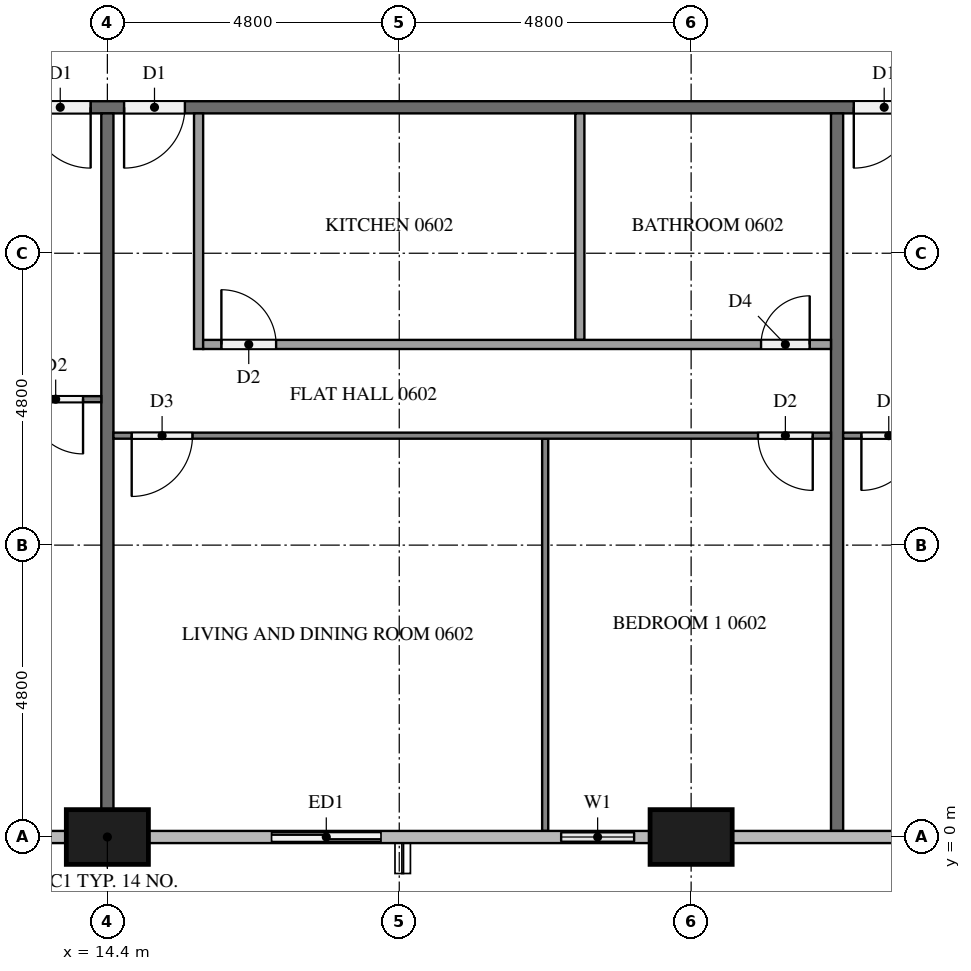
"""IFC4 building model, lengths in metres.
Left out: names, types, materials, properties, quantities, classifications, styles, units other than length and angle.
Written with IfcOpenShell. Run it as: python <this file> out.ifc"""

import sys

from ifc_helpers import new_model, si_unit, direction, frame, frame_2d, origin, origin_2d, place, context, subcontext, project, spatial, rectangle, extrude, element, fill, save


model = new_model("IFC4")
c1 = context("Model", 3, precision=1e-05, world=origin(), true_north=direction((0.0, 1.0)))
c2 = subcontext(c1, "Body", "Model", "MODEL_VIEW")
j1 = project(units=[si_unit("LENGTHUNIT", "METRE"), si_unit("PLANEANGLEUNIT", "RADIAN")], contexts=[c1])
p1 = place(None, origin())
s1 = spatial("IfcSite", under=j1, at=p1, CompositionType="ELEMENT")
p2 = place(p1, origin())
s2 = spatial("IfcBuilding", under=s1, at=p2, CompositionType="ELEMENT")
p3 = place(p2, frame((0.0, 0.0, 29.4)))
s3 = spatial("IfcBuildingStorey", under=s2, at=p3, CompositionType="ELEMENT", Elevation=29.4)
for number, where, z_axis, x_axis in (
    (1, (14.4, 0.0, 0.0), (0.0, 0.0, 1.0), (1.0, 0.0, 0.0)),
    (2, (24.0, 0.0, 0.0), (0.0, 0.0, 1.0), (1.0, 0.0, 0.0)),
):
    element("IfcColumn", number, at=place(p3, frame(where, z_axis=z_axis, x_axis=x_axis)), inside=s3, PredefinedType="COLUMN", context=c2, shape_type="SweptSolid", body=[
        extrude(rectangle(XDim=1.35, YDim=0.9, at=origin_2d()), origin(), (0.0, 0.0, 1.0), 3.2),
    ])
p4 = place(p3, frame((12.0, 0.0, 0.0), z_axis=(0.0, 0.0, 1.0), x_axis=(1.0, 0.0, 0.0)))
e3 = element("IfcWall", 3, at=p4, inside=s3, PredefinedType="SOLIDWALL", context=c2, shape_type="SweptSolid", body=[
    extrude(rectangle(XDim=1.725, YDim=0.15, at=frame_2d((0.863, 0.0))), origin(), (0.0, 0.0, 1.0), 3.2),
])
p5 = place(p4, frame((0.262, 0.0, 0.9)))
e4 = element("IfcOpeningElement", 4, at=p5, cuts=e3, PredefinedType="OPENING", context=c2, shape_type="SweptSolid", body=[
    extrude(rectangle(XDim=1.2, YDim=1.4, at=frame_2d((0.6, 0.7))), frame((0.0, 0.085, 0.0), z_axis=(0.0, -1.0, 0.0), x_axis=(1.0, 0.0, 0.0)), (0.0, 0.0, 1.0), 0.17),
])
p6 = place(p3, frame((16.8, 0.0, 0.0), z_axis=(0.0, 0.0, 1.0), x_axis=(1.0, 0.0, 0.0)))
e5 = element("IfcWall", 5, at=p6, inside=s3, PredefinedType="SOLIDWALL", context=c2, shape_type="SweptSolid", body=[
    extrude(rectangle(XDim=2.4, YDim=0.15, at=frame_2d((1.2, 0.0))), origin(), (0.0, 0.0, 1.0), 3.2),
])
p7 = place(p6, frame((0.3, 0.0, 0.0)))
e6 = element("IfcOpeningElement", 6, at=p7, cuts=e5, PredefinedType="OPENING", context=c2, shape_type="SweptSolid", body=[
    extrude(rectangle(XDim=1.8, YDim=2.4, at=frame_2d((0.9, 1.2))), frame((0.0, 0.085, 0.0), z_axis=(0.0, -1.0, 0.0), x_axis=(1.0, 0.0, 0.0)), (0.0, 0.0, 1.0), 0.17),
])
p8 = place(p3, frame((21.6, 0.0, 0.0), z_axis=(0.0, 0.0, 1.0), x_axis=(1.0, 0.0, 0.0)))
e7 = element("IfcWall", 7, at=p8, inside=s3, PredefinedType="SOLIDWALL", context=c2, shape_type="SweptSolid", body=[
    extrude(rectangle(XDim=1.725, YDim=0.15, at=frame_2d((0.862, 0.0))), origin(), (0.0, 0.0, 1.0), 3.2),
])
p9 = place(p8, frame((0.262, 0.0, 0.9)))
e8 = element("IfcOpeningElement", 8, at=p9, cuts=e7, PredefinedType="OPENING", context=c2, shape_type="SweptSolid", body=[
    extrude(rectangle(XDim=1.2, YDim=1.4, at=frame_2d((0.6, 0.7))), frame((0.0, 0.085, 0.0), z_axis=(0.0, -1.0, 0.0), x_axis=(1.0, 0.0, 0.0)), (0.0, 0.0, 1.0), 0.17),
])
p10 = place(p3, frame((50.5, 12.0, 0.0), z_axis=(0.0, 0.0, 1.0), x_axis=(-1.0, 0.0, 0.0)))
e9 = element("IfcWall", 9, at=p10, inside=s3, PredefinedType="PARTITIONING", context=c2, shape_type="SweptSolid", body=[
    extrude(rectangle(XDim=38.6, YDim=0.2, at=frame_2d((19.3, 0.0))), origin(), (0.0, 0.0, 1.0), 3.2),
])
p11 = place(p10, frame((36.375, 0.0, 0.0)))
e10 = element("IfcOpeningElement", 10, at=p11, cuts=e9, PredefinedType="OPENING", context=c2, shape_type="SweptSolid", body=[
    extrude(rectangle(XDim=1.0, YDim=2.1, at=frame_2d((0.5, 1.05))), frame((0.0, 0.11, 0.0), z_axis=(0.0, -1.0, 0.0), x_axis=(1.0, 0.0, 0.0)), (0.0, 0.0, 1.0), 0.22),
])
p12 = place(p10, frame((34.825, 0.0, 0.0)))
e11 = element("IfcOpeningElement", 11, at=p12, cuts=e9, PredefinedType="OPENING", context=c2, shape_type="SweptSolid", body=[
    extrude(rectangle(XDim=1.0, YDim=2.1, at=frame_2d((0.5, 1.05))), frame((0.0, 0.11, 0.0), z_axis=(0.0, -1.0, 0.0), x_axis=(1.0, 0.0, 0.0)), (0.0, 0.0, 1.0), 0.22),
])
p13 = place(p10, frame((22.825, 0.0, 0.0)))
e12 = element("IfcOpeningElement", 12, at=p13, cuts=e9, PredefinedType="OPENING", context=c2, shape_type="SweptSolid", body=[
    extrude(rectangle(XDim=1.0, YDim=2.1, at=frame_2d((0.5, 1.05))), frame((0.0, 0.11, 0.0), z_axis=(0.0, -1.0, 0.0), x_axis=(1.0, 0.0, 0.0)), (0.0, 0.0, 1.0), 0.22),
])
p14 = place(p10, frame((8.425, 0.0, 0.0)))
e13 = element("IfcOpeningElement", 13, at=p14, cuts=e9, PredefinedType="OPENING", context=c2, shape_type="SweptSolid", body=[
    extrude(rectangle(XDim=1.0, YDim=2.1, at=frame_2d((0.5, 1.05))), frame((0.0, 0.11, 0.0), z_axis=(0.0, -1.0, 0.0), x_axis=(1.0, 0.0, 0.0)), (0.0, 0.0, 1.0), 0.22),
])
p15 = place(p10, frame((1.225, 0.0, 0.0)))
e14 = element("IfcOpeningElement", 14, at=p15, cuts=e9, PredefinedType="OPENING", context=c2, shape_type="SweptSolid", body=[
    extrude(rectangle(XDim=1.0, YDim=2.1, at=frame_2d((0.5, 1.05))), frame((0.0, 0.11, 0.0), z_axis=(0.0, -1.0, 0.0), x_axis=(1.0, 0.0, 0.0)), (0.0, 0.0, 1.0), 0.22),
])
p16 = place(p3, frame((14.4, 11.9, 0.0), z_axis=(0.0, 0.0, 1.0), x_axis=(0.0, -1.0, 0.0)))
e15 = element("IfcWall", 15, at=p16, inside=s3, PredefinedType="PARTITIONING", context=c2, shape_type="SweptSolid", body=[
    extrude(rectangle(XDim=11.45, YDim=0.2, at=frame_2d((5.725, 0.0))), origin(), (0.0, 0.0, 1.0), 3.2),
])
p17 = place(p3, frame((26.4, 11.9, 0.0), z_axis=(0.0, 0.0, 1.0), x_axis=(0.0, -1.0, 0.0)))
e16 = element("IfcWall", 16, at=p17, inside=s3, PredefinedType="PARTITIONING", context=c2, shape_type="SweptSolid", body=[
    extrude(rectangle(XDim=11.8, YDim=0.2, at=frame_2d((5.9, 0.0))), origin(), (0.0, 0.0, 1.0), 3.2),
])
p18 = place(p3, frame((14.3, 7.2, 0.0), z_axis=(0.0, 0.0, 1.0), x_axis=(-1.0, 0.0, 0.0)))
e17 = element("IfcWall", 17, at=p18, inside=s3, PredefinedType="PARTITIONING", context=c2, shape_type="SweptSolid", body=[
    extrude(rectangle(XDim=14.2, YDim=0.1, at=frame_2d((7.1, 0.0))), origin(), (0.0, 0.0, 1.0), 3.2),
])
p19 = place(p18, frame((0.3, 0.0, 0.0)))
e18 = element("IfcOpeningElement", 18, at=p19, cuts=e17, PredefinedType="OPENING", context=c2, shape_type="SweptSolid", body=[
    extrude(rectangle(XDim=0.9, YDim=2.1, at=frame_2d((0.45, 1.05))), frame((0.0, 0.06, 0.0), z_axis=(0.0, -1.0, 0.0), x_axis=(1.0, 0.0, 0.0)), (0.0, 0.0, 1.0), 0.12),
])
p20 = place(p18, frame((8.25, 0.0, 0.0)))
e19 = element("IfcOpeningElement", 19, at=p20, cuts=e17, PredefinedType="OPENING", context=c2, shape_type="SweptSolid", body=[
    extrude(rectangle(XDim=0.9, YDim=2.1, at=frame_2d((0.45, 1.05))), frame((0.0, 0.06, 0.0), z_axis=(0.0, -1.0, 0.0), x_axis=(1.0, 0.0, 0.0)), (0.0, 0.0, 1.0), 0.12),
])
p21 = place(p18, frame((9.85, 0.0, 0.0)))
e20 = element("IfcOpeningElement", 20, at=p21, cuts=e17, PredefinedType="OPENING", context=c2, shape_type="SweptSolid", body=[
    extrude(rectangle(XDim=1.0, YDim=2.1, at=frame_2d((0.5, 1.05))), frame((0.0, 0.06, 0.0), z_axis=(0.0, -1.0, 0.0), x_axis=(1.0, 0.0, 0.0)), (0.0, 0.0, 1.0), 0.12),
])
p22 = place(p3, frame((21.6, 6.55, 0.0), z_axis=(0.0, 0.0, 1.0), x_axis=(0.0, -1.0, 0.0)))
e21 = element("IfcWall", 21, at=p22, inside=s3, PredefinedType="PARTITIONING", context=c2, shape_type="SweptSolid", body=[
    extrude(rectangle(XDim=6.45, YDim=0.1, at=frame_2d((3.225, 0.0))), origin(), (0.0, 0.0, 1.0), 3.2),
])
p23 = place(p3, frame((26.3, 6.6, 0.0), z_axis=(0.0, 0.0, 1.0), x_axis=(-1.0, 0.0, 0.0)))
e22 = element("IfcWall", 22, at=p23, inside=s3, PredefinedType="PARTITIONING", context=c2, shape_type="SweptSolid", body=[
    extrude(rectangle(XDim=11.8, YDim=0.1, at=frame_2d((5.9, 0.0))), origin(), (0.0, 0.0, 1.0), 3.2),
])
p24 = place(p23, frame((10.5, 0.0, 0.0)))
e23 = element("IfcOpeningElement", 23, at=p24, cuts=e22, PredefinedType="OPENING", context=c2, shape_type="SweptSolid", body=[
    extrude(rectangle(XDim=1.0, YDim=2.1, at=frame_2d((0.5, 1.05))), frame((0.0, 0.06, 0.0), z_axis=(0.0, -1.0, 0.0), x_axis=(1.0, 0.0, 0.0)), (0.0, 0.0, 1.0), 0.12),
])
p25 = place(p23, frame((0.3, 0.0, 0.0)))
e24 = element("IfcOpeningElement", 24, at=p25, cuts=e22, PredefinedType="OPENING", context=c2, shape_type="SweptSolid", body=[
    extrude(rectangle(XDim=0.9, YDim=2.1, at=frame_2d((0.45, 1.05))), frame((0.0, 0.06, 0.0), z_axis=(0.0, -1.0, 0.0), x_axis=(1.0, 0.0, 0.0)), (0.0, 0.0, 1.0), 0.12),
])
p26 = place(p3, frame((22.17, 11.9, 0.0), z_axis=(0.0, 0.0, 1.0), x_axis=(0.0, -1.0, 0.0)))
e25 = element("IfcWall", 25, at=p26, inside=s3, PredefinedType="PARTITIONING", context=c2, shape_type="SweptSolid", body=[
    extrude(rectangle(XDim=3.725, YDim=0.15, at=frame_2d((1.862, 0.0))), origin(), (0.0, 0.0, 1.0), 3.2),
])
p27 = place(p3, frame((15.9, 11.9, 0.0), z_axis=(0.0, 0.0, 1.0), x_axis=(0.0, -1.0, 0.0)))
e26 = element("IfcWall", 26, at=p27, inside=s3, PredefinedType="PARTITIONING", context=c2, shape_type="SweptSolid", body=[
    extrude(rectangle(XDim=3.875, YDim=0.15, at=frame_2d((1.938, 0.0))), origin(), (0.0, 0.0, 1.0), 3.2),
])
p28 = place(p3, frame((15.975, 8.1, 0.0), z_axis=(0.0, 0.0, 1.0), x_axis=(1.0, 0.0, 0.0)))
e27 = element("IfcWall", 27, at=p28, inside=s3, PredefinedType="PARTITIONING", context=c2, shape_type="SweptSolid", body=[
    extrude(rectangle(XDim=10.325, YDim=0.15, at=frame_2d((5.163, 0.0))), origin(), (0.0, 0.0, 1.0), 3.2),
])
p29 = place(p28, frame((0.3, 0.0, 0.0)))
e28 = element("IfcOpeningElement", 28, at=p29, cuts=e27, PredefinedType="OPENING", context=c2, shape_type="SweptSolid", body=[
    extrude(rectangle(XDim=0.9, YDim=2.1, at=frame_2d((0.45, 1.05))), frame((0.0, 0.085, 0.0), z_axis=(0.0, -1.0, 0.0), x_axis=(1.0, 0.0, 0.0)), (0.0, 0.0, 1.0), 0.17),
])
p30 = place(p28, frame((9.175, 0.0, 0.0)))
e29 = element("IfcOpeningElement", 29, at=p30, cuts=e27, PredefinedType="OPENING", context=c2, shape_type="SweptSolid", body=[
    extrude(rectangle(XDim=0.8, YDim=2.1, at=frame_2d((0.4, 1.05))), frame((0.0, 0.085, 0.0), z_axis=(0.0, -1.0, 0.0), x_axis=(1.0, 0.0, 0.0)), (0.0, 0.0, 1.0), 0.17),
])
p31 = place(p3, frame((40.7, 6.6, 0.0), z_axis=(0.0, 0.0, 1.0), x_axis=(-1.0, 0.0, 0.0)))
e30 = element("IfcWall", 30, at=p31, inside=s3, PredefinedType="PARTITIONING", context=c2, shape_type="SweptSolid", body=[
    extrude(rectangle(XDim=14.2, YDim=0.1, at=frame_2d((7.1, 0.0))), origin(), (0.0, 0.0, 1.0), 3.2),
])
p32 = place(p31, frame((13.0, 0.0, 0.0)))
e31 = element("IfcOpeningElement", 31, at=p32, cuts=e30, PredefinedType="OPENING", context=c2, shape_type="SweptSolid", body=[
    extrude(rectangle(XDim=0.9, YDim=2.1, at=frame_2d((0.45, 1.05))), frame((0.0, 0.06, 0.0), z_axis=(0.0, -1.0, 0.0), x_axis=(1.0, 0.0, 0.0)), (0.0, 0.0, 1.0), 0.12),
])
p33 = place(p31, frame((5.05, 0.0, 0.0)))
e32 = element("IfcOpeningElement", 32, at=p33, cuts=e30, PredefinedType="OPENING", context=c2, shape_type="SweptSolid", body=[
    extrude(rectangle(XDim=0.9, YDim=2.1, at=frame_2d((0.45, 1.05))), frame((0.0, 0.06, 0.0), z_axis=(0.0, -1.0, 0.0), x_axis=(1.0, 0.0, 0.0)), (0.0, 0.0, 1.0), 0.12),
])
p34 = place(p31, frame((3.35, 0.0, 0.0)))
e33 = element("IfcOpeningElement", 33, at=p34, cuts=e30, PredefinedType="OPENING", context=c2, shape_type="SweptSolid", body=[
    extrude(rectangle(XDim=1.0, YDim=2.1, at=frame_2d((0.5, 1.05))), frame((0.0, 0.06, 0.0), z_axis=(0.0, -1.0, 0.0), x_axis=(1.0, 0.0, 0.0)), (0.0, 0.0, 1.0), 0.12),
])
p35 = place(p7, origin())
e34 = element("IfcDoor", 34, at=p35, inside=s3, OperationType="SLIDING_TO_LEFT", PredefinedType="DOOR", context=c2, shape_type="SweptSolid", body=[
    extrude(rectangle(XDim=1.8, YDim=2.4, at=frame_2d((0.9, 1.2))), frame((0.0, 0.025, 0.0), z_axis=(0.0, -1.0, 0.0), x_axis=(1.0, 0.0, 0.0)), (0.0, 0.0, 1.0), 0.05),
])
fill(e6, e34)
p36 = place(p9, origin())
e35 = element("IfcWindow", 35, at=p36, inside=s3, PartitioningType="SINGLE_PANEL", PredefinedType="WINDOW", context=c2, shape_type="SweptSolid", body=[
    extrude(rectangle(XDim=1.2, YDim=1.4, at=frame_2d((0.6, 0.7))), frame((0.0, 0.03, 0.0), z_axis=(0.0, -1.0, 0.0), x_axis=(1.0, 0.0, 0.0)), (0.0, 0.0, 1.0), 0.06),
])
fill(e8, e35)
p37 = place(p11, origin())
e36 = element("IfcDoor", 36, at=p37, inside=s3, OperationType="SINGLE_SWING_LEFT", PredefinedType="DOOR", context=c2, shape_type="SweptSolid", body=[
    extrude(rectangle(XDim=1.0, YDim=2.1, at=frame_2d((0.5, 1.05))), frame((0.0, 0.025, 0.0), z_axis=(0.0, -1.0, 0.0), x_axis=(1.0, 0.0, 0.0)), (0.0, 0.0, 1.0), 0.05),
])
fill(e10, e36)
p38 = place(p12, origin())
e37 = element("IfcDoor", 37, at=p38, inside=s3, OperationType="SINGLE_SWING_RIGHT", PredefinedType="DOOR", context=c2, shape_type="SweptSolid", body=[
    extrude(rectangle(XDim=1.0, YDim=2.1, at=frame_2d((0.5, 1.05))), frame((0.0, 0.025, 0.0), z_axis=(0.0, -1.0, 0.0), x_axis=(1.0, 0.0, 0.0)), (0.0, 0.0, 1.0), 0.05),
])
fill(e11, e37)
p39 = place(p13, origin())
e38 = element("IfcDoor", 38, at=p39, inside=s3, OperationType="SINGLE_SWING_RIGHT", PredefinedType="DOOR", context=c2, shape_type="SweptSolid", body=[
    extrude(rectangle(XDim=1.0, YDim=2.1, at=frame_2d((0.5, 1.05))), frame((0.0, 0.025, 0.0), z_axis=(0.0, -1.0, 0.0), x_axis=(1.0, 0.0, 0.0)), (0.0, 0.0, 1.0), 0.05),
])
fill(e12, e38)
p40 = place(p19, origin())
e39 = element("IfcDoor", 39, at=p40, inside=s3, OperationType="SINGLE_SWING_LEFT", PredefinedType="DOOR", context=c2, shape_type="SweptSolid", body=[
    extrude(rectangle(XDim=0.9, YDim=2.1, at=frame_2d((0.45, 1.05))), frame((0.0, 0.025, 0.0), z_axis=(0.0, -1.0, 0.0), x_axis=(1.0, 0.0, 0.0)), (0.0, 0.0, 1.0), 0.05),
])
fill(e18, e39)
p41 = place(p24, origin())
e40 = element("IfcDoor", 40, at=p41, inside=s3, OperationType="SINGLE_SWING_RIGHT", PredefinedType="DOOR", context=c2, shape_type="SweptSolid", body=[
    extrude(rectangle(XDim=1.0, YDim=2.1, at=frame_2d((0.5, 1.05))), frame((0.0, 0.025, 0.0), z_axis=(0.0, -1.0, 0.0), x_axis=(1.0, 0.0, 0.0)), (0.0, 0.0, 1.0), 0.05),
])
fill(e23, e40)
p42 = place(p25, origin())
e41 = element("IfcDoor", 41, at=p42, inside=s3, OperationType="SINGLE_SWING_LEFT", PredefinedType="DOOR", context=c2, shape_type="SweptSolid", body=[
    extrude(rectangle(XDim=0.9, YDim=2.1, at=frame_2d((0.45, 1.05))), frame((0.0, 0.025, 0.0), z_axis=(0.0, -1.0, 0.0), x_axis=(1.0, 0.0, 0.0)), (0.0, 0.0, 1.0), 0.05),
])
fill(e24, e41)
p43 = place(p29, origin())
e42 = element("IfcDoor", 42, at=p43, inside=s3, OperationType="SINGLE_SWING_LEFT", PredefinedType="DOOR", context=c2, shape_type="SweptSolid", body=[
    extrude(rectangle(XDim=0.9, YDim=2.1, at=frame_2d((0.45, 1.05))), frame((0.0, 0.025, 0.0), z_axis=(0.0, -1.0, 0.0), x_axis=(1.0, 0.0, 0.0)), (0.0, 0.0, 1.0), 0.05),
])
fill(e28, e42)
p44 = place(p30, origin())
e43 = element("IfcDoor", 43, at=p44, inside=s3, OperationType="SINGLE_SWING_RIGHT", PredefinedType="DOOR", context=c2, shape_type="SweptSolid", body=[
    extrude(rectangle(XDim=0.8, YDim=2.1, at=frame_2d((0.4, 1.05))), frame((0.0, 0.025, 0.0), z_axis=(0.0, -1.0, 0.0), x_axis=(1.0, 0.0, 0.0)), (0.0, 0.0, 1.0), 0.05),
])
fill(e29, e43)
p45 = place(p32, origin())
e44 = element("IfcDoor", 44, at=p45, inside=s3, OperationType="SINGLE_SWING_RIGHT", PredefinedType="DOOR", context=c2, shape_type="SweptSolid", body=[
    extrude(rectangle(XDim=0.9, YDim=2.1, at=frame_2d((0.45, 1.05))), frame((0.0, 0.025, 0.0), z_axis=(0.0, -1.0, 0.0), x_axis=(1.0, 0.0, 0.0)), (0.0, 0.0, 1.0), 0.05),
])
fill(e31, e44)
save(model, sys.argv[1])
